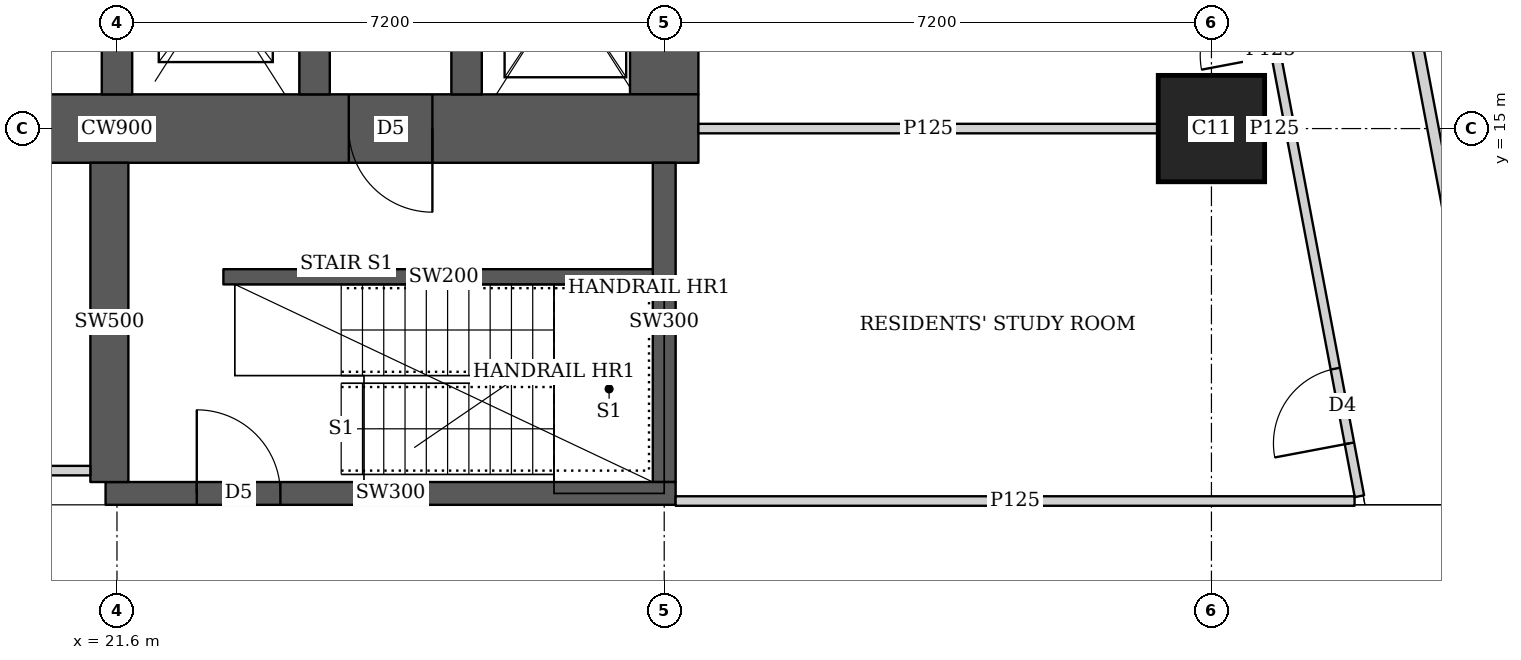
"""IFC4 building model, lengths in metres.
Left out: names, types, materials, properties, quantities, classifications, styles, units other than length and angle.
Written with IfcOpenShell. Run it as: python <this file> out.ifc"""

import sys

from ifc_helpers import new_model, si_unit, direction, frame, frame_2d, origin, origin_2d, place, context, subcontext, project, spatial, rectangle, extrude, element, fill, save


model = new_model("IFC4")
c1 = context("Model", 3, precision=1e-05, world=origin(), true_north=direction((0.0, 1.0)))
c2 = subcontext(c1, "Body", "Model", "MODEL_VIEW")
j1 = project(units=[si_unit("LENGTHUNIT", "METRE"), si_unit("PLANEANGLEUNIT", "RADIAN")], contexts=[c1])
p1 = place(None, origin())
s1 = spatial("IfcSite", under=j1, at=p1, CompositionType="ELEMENT")
p2 = place(p1, origin())
s2 = spatial("IfcBuilding", under=s1, at=p2, CompositionType="ELEMENT")
p3 = place(p2, frame((0.0, 0.0, 251.6)))
s3 = spatial("IfcBuildingStorey", under=s2, at=p3, CompositionType="ELEMENT", Elevation=251.6)
p4 = place(p3, frame((36.0, 15.0, 0.0), z_axis=(0.0, 0.0, 1.0), x_axis=(1.0, 0.0, 0.0)))
e1 = element("IfcColumn", 1, at=p4, inside=s3, PredefinedType="COLUMN", context=c2, shape_type="SweptSolid", body=[
    extrude(rectangle(XDim=1.4, YDim=1.4, at=origin_2d()), origin(), (0.0, 0.0, 1.0), 3.75),
])
p5 = place(p3, frame((13.95, 15.0, 0.0), z_axis=(0.0, 0.0, 1.0), x_axis=(1.0, 0.0, 0.0)))
e2 = element("IfcWall", 2, at=p5, inside=s3, PredefinedType="SHEAR", context=c2, shape_type="SweptSolid", body=[
    extrude(rectangle(XDim=15.3, YDim=0.9, at=frame_2d((7.65, 0.0))), origin(), (0.0, 0.0, 1.0), 3.75),
])
p6 = place(p5, frame((4.45, 0.0, 0.0)))
e3 = element("IfcOpeningElement", 3, at=p6, cuts=e2, PredefinedType="OPENING", context=c2, shape_type="SweptSolid", body=[
    extrude(rectangle(XDim=1.8, YDim=2.1, at=frame_2d((0.9, 1.05))), frame((0.0, 0.46, 0.0), z_axis=(0.0, -1.0, 0.0), x_axis=(1.0, 0.0, 0.0)), (0.0, 0.0, 1.0), 0.92),
])
p7 = place(p5, frame((10.7, 0.0, 0.0)))
e4 = element("IfcOpeningElement", 4, at=p7, cuts=e2, PredefinedType="OPENING", context=c2, shape_type="SweptSolid", body=[
    extrude(rectangle(XDim=1.1, YDim=2.1, at=frame_2d((0.55, 1.05))), frame((0.0, 0.46, 0.0), z_axis=(0.0, -1.0, 0.0), x_axis=(1.0, 0.0, 0.0)), (0.0, 0.0, 1.0), 0.92),
])
p8 = place(p3, frame((28.8, 15.45, 0.0), z_axis=(0.0, 0.0, 1.0), x_axis=(0.0, 1.0, 0.0)))
e5 = element("IfcWall", 5, at=p8, inside=s3, PredefinedType="SHEAR", context=c2, shape_type="SweptSolid", body=[
    extrude(rectangle(XDim=14.1, YDim=0.9, at=frame_2d((7.05, 0.0))), origin(), (0.0, 0.0, 1.0), 3.75),
])
p9 = place(p3, frame((21.6, 15.45, 0.0), z_axis=(0.0, 0.0, 1.0), x_axis=(0.0, 1.0, 0.0)))
e6 = element("IfcWall", 6, at=p9, inside=s3, PredefinedType="SHEAR", context=c2, shape_type="SweptSolid", body=[
    extrude(rectangle(XDim=14.1, YDim=0.4, at=frame_2d((7.05, 0.0))), origin(), (0.0, 0.0, 1.0), 3.75),
])
p10 = place(p9, frame((0.875, 0.0, 0.0)))
e7 = element("IfcOpeningElement", 7, at=p10, cuts=e6, PredefinedType="OPENING", context=c2, shape_type="SweptSolid", body=[
    extrude(rectangle(XDim=1.1, YDim=2.1, at=frame_2d((0.55, 1.05))), frame((0.0, 0.21, 0.0), z_axis=(0.0, -1.0, 0.0), x_axis=(1.0, 0.0, 0.0)), (0.0, 0.0, 1.0), 0.42),
])
p11 = place(p9, frame((4.625, 0.0, 0.0)))
e8 = element("IfcOpeningElement", 8, at=p11, cuts=e6, PredefinedType="OPENING", context=c2, shape_type="SweptSolid", body=[
    extrude(rectangle(XDim=1.1, YDim=2.1, at=frame_2d((0.55, 1.05))), frame((0.0, 0.21, 0.0), z_axis=(0.0, -1.0, 0.0), x_axis=(1.0, 0.0, 0.0)), (0.0, 0.0, 1.0), 0.42),
])
p12 = place(p9, frame((8.375, 0.0, 0.0)))
e9 = element("IfcOpeningElement", 9, at=p12, cuts=e6, PredefinedType="OPENING", context=c2, shape_type="SweptSolid", body=[
    extrude(rectangle(XDim=1.1, YDim=2.1, at=frame_2d((0.55, 1.05))), frame((0.0, 0.21, 0.0), z_axis=(0.0, -1.0, 0.0), x_axis=(1.0, 0.0, 0.0)), (0.0, 0.0, 1.0), 0.42),
])
p13 = place(p9, frame((12.125, 0.0, 0.0)))
e10 = element("IfcOpeningElement", 10, at=p13, cuts=e6, PredefinedType="OPENING", context=c2, shape_type="SweptSolid", body=[
    extrude(rectangle(XDim=1.1, YDim=2.1, at=frame_2d((0.55, 1.05))), frame((0.0, 0.21, 0.0), z_axis=(0.0, -1.0, 0.0), x_axis=(1.0, 0.0, 0.0)), (0.0, 0.0, 1.0), 0.42),
])
p14 = place(p3, frame((24.2, 15.45, 0.0), z_axis=(0.0, 0.0, 1.0), x_axis=(0.0, 1.0, 0.0)))
e11 = element("IfcWall", 11, at=p14, inside=s3, PredefinedType="SHEAR", context=c2, shape_type="SweptSolid", body=[
    extrude(rectangle(XDim=14.1, YDim=0.4, at=frame_2d((7.05, 0.0))), origin(), (0.0, 0.0, 1.0), 3.75),
])
p15 = place(p3, frame((26.2, 15.45, 0.0), z_axis=(0.0, 0.0, 1.0), x_axis=(0.0, 1.0, 0.0)))
e12 = element("IfcWall", 12, at=p15, inside=s3, PredefinedType="SHEAR", context=c2, shape_type="SweptSolid", body=[
    extrude(rectangle(XDim=3.1, YDim=0.4, at=frame_2d((1.55, 0.0))), origin(), (0.0, 0.0, 1.0), 3.75),
])
p16 = place(p15, frame((0.825, 0.0, 0.0)))
e13 = element("IfcOpeningElement", 13, at=p16, cuts=e12, PredefinedType="OPENING", context=c2, shape_type="SweptSolid", body=[
    extrude(rectangle(XDim=1.2, YDim=2.1, at=frame_2d((0.6, 1.05))), frame((0.0, 0.21, 0.0), z_axis=(0.0, -1.0, 0.0), x_axis=(1.0, 0.0, 0.0)), (0.0, 0.0, 1.0), 0.42),
])
p17 = place(p3, frame((21.45, 10.2, 0.0), z_axis=(0.0, 0.0, 1.0), x_axis=(1.0, 0.0, 0.0)))
e14 = element("IfcWall", 14, at=p17, inside=s3, PredefinedType="SHEAR", context=c2, shape_type="SweptSolid", body=[
    extrude(rectangle(XDim=7.5, YDim=0.3, at=frame_2d((3.75, 0.0))), origin(), (0.0, 0.0, 1.0), 3.75),
])
p18 = place(p17, frame((1.2, 0.0, 0.0)))
e15 = element("IfcOpeningElement", 15, at=p18, cuts=e14, PredefinedType="OPENING", context=c2, shape_type="SweptSolid", body=[
    extrude(rectangle(XDim=1.1, YDim=2.1, at=frame_2d((0.55, 1.05))), frame((0.0, 0.16, 0.0), z_axis=(0.0, -1.0, 0.0), x_axis=(1.0, 0.0, 0.0)), (0.0, 0.0, 1.0), 0.32),
])
p19 = place(p3, frame((21.5, 10.35, 0.0), z_axis=(0.0, 0.0, 1.0), x_axis=(0.0, 1.0, 0.0)))
e16 = element("IfcWall", 16, at=p19, inside=s3, PredefinedType="SHEAR", context=c2, shape_type="SweptSolid", body=[
    extrude(rectangle(XDim=4.2, YDim=0.5, at=frame_2d((2.1, 0.0))), origin(), (0.0, 0.0, 1.0), 3.75),
])
p20 = place(p3, frame((28.8, 10.35, 0.0), z_axis=(0.0, 0.0, 1.0), x_axis=(0.0, 1.0, 0.0)))
e17 = element("IfcWall", 17, at=p20, inside=s3, PredefinedType="SHEAR", context=c2, shape_type="SweptSolid", body=[
    extrude(rectangle(XDim=4.2, YDim=0.3, at=frame_2d((2.1, 0.0))), origin(), (0.0, 0.0, 1.0), 3.75),
])
p21 = place(p3, frame((33.781, 42.186, 0.0), z_axis=(0.0, 0.0, 1.0), x_axis=(0.185593518645, -0.9826266055, 0.0)))
e18 = element("IfcWall", 18, at=p21, inside=s3, PredefinedType="SOLIDWALL", context=c2, shape_type="SweptSolid", body=[
    extrude(rectangle(XDim=35.961, YDim=0.15, at=frame_2d((17.98, 0.0))), origin(), (0.0, 0.0, 1.0), 2.5),
])
p22 = place(p21, frame((7.183, 0.0, 0.0)))
e19 = element("IfcOpeningElement", 19, at=p22, cuts=e18, PredefinedType="OPENING", context=c2, shape_type="SweptSolid", body=[
    extrude(rectangle(XDim=1.0, YDim=2.1, at=frame_2d((0.5, 1.05))), frame((0.0, 0.085, 0.0), z_axis=(0.0, -1.0, 0.0), x_axis=(1.0, 0.0, 0.0)), (0.0, 0.0, 1.0), 0.17),
])
p23 = place(p21, frame((11.76, 0.0, 0.0)))
e20 = element("IfcOpeningElement", 20, at=p23, cuts=e18, PredefinedType="OPENING", context=c2, shape_type="SweptSolid", body=[
    extrude(rectangle(XDim=1.0, YDim=2.1, at=frame_2d((0.5, 1.05))), frame((0.0, 0.085, 0.0), z_axis=(0.0, -1.0, 0.0), x_axis=(1.0, 0.0, 0.0)), (0.0, 0.0, 1.0), 0.17),
])
p24 = place(p21, frame((23.863, 0.0, 0.0)))
e21 = element("IfcOpeningElement", 21, at=p24, cuts=e18, PredefinedType="OPENING", context=c2, shape_type="SweptSolid", body=[
    extrude(rectangle(XDim=1.0, YDim=2.1, at=frame_2d((0.5, 1.05))), frame((0.0, 0.085, 0.0), z_axis=(0.0, -1.0, 0.0), x_axis=(1.0, 0.0, 0.0)), (0.0, 0.0, 1.0), 0.17),
])
p25 = place(p21, frame((30.502, 0.0, 0.0)))
e22 = element("IfcOpeningElement", 22, at=p25, cuts=e18, PredefinedType="OPENING", context=c2, shape_type="SweptSolid", body=[
    extrude(rectangle(XDim=1.0, YDim=2.1, at=frame_2d((0.5, 1.05))), frame((0.0, 0.085, 0.0), z_axis=(0.0, -1.0, 0.0), x_axis=(1.0, 0.0, 0.0)), (0.0, 0.0, 1.0), 0.17),
])
p26 = place(p3, frame((13.75, 10.5, 0.0), z_axis=(0.0, 0.0, 1.0), x_axis=(1.0, 0.0, 0.0)))
e23 = element("IfcWall", 23, at=p26, inside=s3, PredefinedType="PARTITIONING", context=c2, shape_type="SweptSolid", body=[
    extrude(rectangle(XDim=7.5, YDim=0.125, at=frame_2d((3.75, 0.0))), origin(), (0.0, 0.0, 1.0), 3.5),
])
p27 = place(p26, frame((4.245, 0.0, 0.0)))
e24 = element("IfcOpeningElement", 24, at=p27, cuts=e23, PredefinedType="OPENING", context=c2, shape_type="SweptSolid", body=[
    extrude(rectangle(XDim=1.8, YDim=2.1, at=frame_2d((0.9, 1.05))), frame((0.0, 0.073, 0.0), z_axis=(0.0, -1.0, 0.0), x_axis=(1.0, 0.0, 0.0)), (0.0, 0.0, 1.0), 0.145),
])
p28 = place(p3, frame((28.95, 10.1, 0.0), z_axis=(0.0, 0.0, 1.0), x_axis=(1.0, 0.0, 0.0)))
e25 = element("IfcWall", 25, at=p28, inside=s3, PredefinedType="PARTITIONING", context=c2, shape_type="SweptSolid", body=[
    extrude(rectangle(XDim=8.933, YDim=0.125, at=frame_2d((4.467, 0.0))), origin(), (0.0, 0.0, 1.0), 3.5),
])
p29 = place(p3, frame((37.947, 10.163, 0.0), z_axis=(0.0, 0.0, 1.0), x_axis=(-0.185589250699, 0.982627411599, 0.0)))
e26 = element("IfcWall", 26, at=p29, inside=s3, PredefinedType="PARTITIONING", context=c2, shape_type="SweptSolid", body=[
    extrude(rectangle(XDim=12.555, YDim=0.125, at=frame_2d((6.277, 0.0))), origin(), (0.0, 0.0, 1.0), 2.5),
])
p30 = place(p29, frame((0.708, 0.0, 0.0)))
e27 = element("IfcOpeningElement", 27, at=p30, cuts=e26, PredefinedType="OPENING", context=c2, shape_type="SweptSolid", body=[
    extrude(rectangle(XDim=1.0, YDim=2.1, at=frame_2d((0.5, 1.05))), frame((0.0, 0.073, 0.0), z_axis=(0.0, -1.0, 0.0), x_axis=(1.0, 0.0, 0.0)), (0.0, 0.0, 1.0), 0.145),
])
p31 = place(p29, frame((5.9, 0.0, 0.0)))
e28 = element("IfcOpeningElement", 28, at=p31, cuts=e26, PredefinedType="OPENING", context=c2, shape_type="SweptSolid", body=[
    extrude(rectangle(XDim=1.0, YDim=2.1, at=frame_2d((0.5, 1.05))), frame((0.0, 0.073, 0.0), z_axis=(0.0, -1.0, 0.0), x_axis=(1.0, 0.0, 0.0)), (0.0, 0.0, 1.0), 0.145),
])
p32 = place(p29, frame((9.562, 0.0, 0.0)))
e29 = element("IfcOpeningElement", 29, at=p32, cuts=e26, PredefinedType="OPENING", context=c2, shape_type="SweptSolid", body=[
    extrude(rectangle(XDim=1.0, YDim=2.1, at=frame_2d((0.5, 1.05))), frame((0.0, 0.073, 0.0), z_axis=(0.0, -1.0, 0.0), x_axis=(1.0, 0.0, 0.0)), (0.0, 0.0, 1.0), 0.145),
])
p33 = place(p3, frame((29.25, 15.0, 0.0), z_axis=(0.0, 0.0, 1.0), x_axis=(1.0, 0.0, 0.0)))
e30 = element("IfcWall", 30, at=p33, inside=s3, PredefinedType="PARTITIONING", context=c2, shape_type="SweptSolid", body=[
    extrude(rectangle(XDim=6.049, YDim=0.125, at=frame_2d((3.024, 0.0))), origin(), (0.0, 0.0, 1.0), 3.5),
])
p34 = place(p3, frame((36.701, 15.0, 0.0), z_axis=(0.0, 0.0, 1.0), x_axis=(1.0, 0.0, 0.0)))
e31 = element("IfcWall", 31, at=p34, inside=s3, PredefinedType="PARTITIONING", context=c2, shape_type="SweptSolid", body=[
    extrude(rectangle(XDim=0.257, YDim=0.125, at=frame_2d((0.128, 0.0))), origin(), (0.0, 0.0, 1.0), 3.5),
])
p35 = place(p3, frame((23.0, 13.05, 0.0), z_axis=(0.0, 0.0, 1.0), x_axis=(1.0, 0.0, 0.0)))
e32 = element("IfcWall", 32, at=p35, inside=s3, PredefinedType="SHEAR", context=c2, shape_type="SweptSolid", body=[
    extrude(rectangle(XDim=5.8, YDim=0.2, at=frame_2d((2.9, 0.0))), origin(), (0.0, 0.0, 1.0), 3.75),
])
p36 = place(p30, origin())
e33 = element("IfcDoor", 33, at=p36, inside=s3, OperationType="SINGLE_SWING_LEFT", PredefinedType="DOOR", context=c2, shape_type="SweptSolid", body=[
    extrude(rectangle(XDim=1.0, YDim=2.1, at=frame_2d((0.5, 1.05))), frame((0.0, 0.025, 0.0), z_axis=(0.0, -1.0, 0.0), x_axis=(1.0, 0.0, 0.0)), (0.0, 0.0, 1.0), 0.05),
])
fill(e27, e33)
p37 = place(p31, origin())
e34 = element("IfcDoor", 34, at=p37, inside=s3, OperationType="SINGLE_SWING_LEFT", PredefinedType="DOOR", context=c2, shape_type="SweptSolid", body=[
    extrude(rectangle(XDim=1.0, YDim=2.1, at=frame_2d((0.5, 1.05))), frame((0.0, 0.025, 0.0), z_axis=(0.0, -1.0, 0.0), x_axis=(1.0, 0.0, 0.0)), (0.0, 0.0, 1.0), 0.05),
])
fill(e28, e34)
p38 = place(p7, origin())
e35 = element("IfcDoor", 35, at=p38, inside=s3, OperationType="SINGLE_SWING_LEFT", PredefinedType="DOOR", context=c2, shape_type="SweptSolid", body=[
    extrude(rectangle(XDim=1.1, YDim=2.1, at=frame_2d((0.55, 1.05))), frame((0.0, 0.025, 0.0), z_axis=(0.0, -1.0, 0.0), x_axis=(1.0, 0.0, 0.0)), (0.0, 0.0, 1.0), 0.05),
])
fill(e4, e35)
p39 = place(p18, origin())
e36 = element("IfcDoor", 36, at=p39, inside=s3, OperationType="SINGLE_SWING_LEFT", PredefinedType="DOOR", context=c2, shape_type="SweptSolid", body=[
    extrude(rectangle(XDim=1.1, YDim=2.1, at=frame_2d((0.55, 1.05))), frame((0.0, 0.025, 0.0), z_axis=(0.0, -1.0, 0.0), x_axis=(1.0, 0.0, 0.0)), (0.0, 0.0, 1.0), 0.05),
])
fill(e15, e36)
save(model, sys.argv[1])
